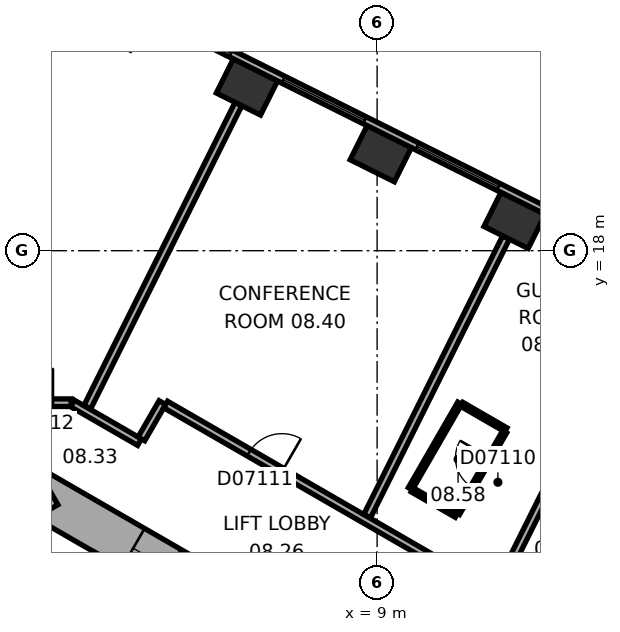
"""IFC4 building model, lengths in metres.
Left out: names, types, materials, properties, quantities, classifications, styles, units other than length and angle.
Written with IfcOpenShell. Run it as: python <this file> out.ifc"""

import sys

from ifc_helpers import new_model, si_unit, direction, frame, frame_2d, origin, origin_2d, place, context, subcontext, project, spatial, rectangle, extrude, element, fill, save


model = new_model("IFC4")
c1 = context("Model", 3, precision=1e-05, world=origin(), true_north=direction((0.0, 1.0)))
c2 = subcontext(c1, "Body", "Model", "MODEL_VIEW")
j1 = project(units=[si_unit("LENGTHUNIT", "METRE"), si_unit("PLANEANGLEUNIT", "RADIAN")], contexts=[c1])
p1 = place(None, origin())
s1 = spatial("IfcSite", under=j1, at=p1, CompositionType="ELEMENT")
p2 = place(p1, origin())
s2 = spatial("IfcBuilding", under=s1, at=p2, CompositionType="ELEMENT")
p3 = place(p2, frame((0.0, 0.0, 47.3)))
s3 = spatial("IfcBuildingStorey", under=s2, at=p3, CompositionType="ELEMENT", Elevation=47.3)
for number, where, z_axis, x_axis in (
    (1, (12.616, 18.795, 0.0), (0.0, 0.0, 1.0), (-0.895, 0.446, 0.0)),
    (2, (9.095, 20.551, 0.0), (0.0, 0.0, 1.0), (-0.895, 0.446, 0.0)),
    (3, (5.574, 22.306, 0.0), (0.0, 0.0, 1.0), (-0.895, 0.446, 0.0)),
):
    element("IfcColumn", number, at=place(p3, frame(where, z_axis=z_axis, x_axis=x_axis)), inside=s3, PredefinedType="COLUMN", context=c2, shape_type="SweptSolid", body=[
        extrude(rectangle(XDim=1.3, YDim=1.0, at=origin_2d()), origin(), (0.0, 0.0, 1.0), 3.3),
    ])
p4 = place(p3, frame((10.4, 5.658, 0.0), z_axis=(0.0, 0.0, 1.0), x_axis=(-0.866021384402, 0.500006961711, 0.0)))
e4 = element("IfcWall", 4, at=p4, inside=s3, PredefinedType="SHEAR", context=c2, shape_type="SweptSolid", body=[
    extrude(rectangle(XDim=12.355, YDim=1.2, at=frame_2d((6.178, 0.0))), origin(), (0.0, 0.0, 1.0), 3.3),
])
p5 = place(p4, frame((2.728, 0.0, 0.0)))
e5 = element("IfcOpeningElement", 5, at=p5, cuts=e4, PredefinedType="OPENING", context=c2, shape_type="SweptSolid", body=[
    extrude(rectangle(XDim=1.1, YDim=2.1, at=frame_2d((0.55, 1.05))), frame((0.0, 0.61, 0.0), z_axis=(0.0, -1.0, 0.0), x_axis=(1.0, 0.0, 0.0)), (0.0, 0.0, 1.0), 1.22),
])
p6 = place(p4, frame((5.328, 0.0, 0.0)))
e6 = element("IfcOpeningElement", 6, at=p6, cuts=e4, PredefinedType="OPENING", context=c2, shape_type="SweptSolid", body=[
    extrude(rectangle(XDim=1.1, YDim=2.1, at=frame_2d((0.55, 1.05))), frame((0.0, 0.61, 0.0), z_axis=(0.0, -1.0, 0.0), x_axis=(1.0, 0.0, 0.0)), (0.0, 0.0, 1.0), 1.22),
])
p7 = place(p4, frame((7.928, 0.0, 0.0)))
e7 = element("IfcOpeningElement", 7, at=p7, cuts=e4, PredefinedType="OPENING", context=c2, shape_type="SweptSolid", body=[
    extrude(rectangle(XDim=1.1, YDim=2.1, at=frame_2d((0.55, 1.05))), frame((0.0, 0.61, 0.0), z_axis=(0.0, -1.0, 0.0), x_axis=(1.0, 0.0, 0.0)), (0.0, 0.0, 1.0), 1.22),
])
p8 = place(p3, frame((0.3, 11.836, 0.0), z_axis=(0.0, 0.0, 1.0), x_axis=(-0.866021384402, -0.500006961711, 0.0)))
e8 = element("IfcWall", 8, at=p8, inside=s3, PredefinedType="SHEAR", context=c2, shape_type="SweptSolid", body=[
    extrude(rectangle(XDim=12.355, YDim=1.2, at=frame_2d((6.178, 0.0))), origin(), (0.0, 0.0, 1.0), 3.3),
])
p9 = place(p8, frame((6.378, 0.0, 0.0)))
e9 = element("IfcOpeningElement", 9, at=p9, cuts=e8, PredefinedType="OPENING", context=c2, shape_type="SweptSolid", body=[
    extrude(rectangle(XDim=1.5, YDim=2.1, at=frame_2d((0.75, 1.05))), frame((0.0, 0.61, 0.0), z_axis=(0.0, -1.0, 0.0), x_axis=(1.0, 0.0, 0.0)), (0.0, 0.0, 1.0), 1.22),
])
p10 = place(p8, frame((1.828, 0.0, 0.0)))
e10 = element("IfcOpeningElement", 10, at=p10, cuts=e8, PredefinedType="OPENING", context=c2, shape_type="SweptSolid", body=[
    extrude(rectangle(XDim=1.1, YDim=2.1, at=frame_2d((0.55, 1.05))), frame((0.0, 0.61, 0.0), z_axis=(0.0, -1.0, 0.0), x_axis=(1.0, 0.0, 0.0)), (0.0, 0.0, 1.0), 1.22),
])
p11 = place(p3, frame((20.63, 15.47, 0.0), z_axis=(0.0, 0.0, 1.0), x_axis=(-0.894934518609, 0.446197498203, 0.0)))
e11 = element("IfcWall", 11, at=p11, inside=s3, PredefinedType="STANDARD", context=c2, shape_type="SweptSolid", body=[
    extrude(rectangle(XDim=21.246, YDim=0.2, at=frame_2d((10.623, 0.0))), origin(), (0.0, 0.0, 1.0), 3.3),
])
p12 = place(p11, frame((1.553, 0.0, 0.8)))
e12 = element("IfcOpeningElement", 12, at=p12, cuts=e11, PredefinedType="OPENING", context=c2, shape_type="SweptSolid", body=[
    extrude(rectangle(XDim=2.4, YDim=1.7, at=frame_2d((1.2, 0.85))), frame((0.0, 0.11, 0.0), z_axis=(0.0, -1.0, 0.0), x_axis=(1.0, 0.0, 0.0)), (0.0, 0.0, 1.0), 0.22),
])
p13 = place(p11, frame((5.488, 0.0, 0.8)))
e13 = element("IfcOpeningElement", 13, at=p13, cuts=e11, PredefinedType="OPENING", context=c2, shape_type="SweptSolid", body=[
    extrude(rectangle(XDim=2.4, YDim=1.7, at=frame_2d((1.2, 0.85))), frame((0.0, 0.11, 0.0), z_axis=(0.0, -1.0, 0.0), x_axis=(1.0, 0.0, 0.0)), (0.0, 0.0, 1.0), 0.22),
])
p14 = place(p11, frame((9.422, 0.0, 0.8)))
e14 = element("IfcOpeningElement", 14, at=p14, cuts=e11, PredefinedType="OPENING", context=c2, shape_type="SweptSolid", body=[
    extrude(rectangle(XDim=2.4, YDim=1.7, at=frame_2d((1.2, 0.85))), frame((0.0, 0.11, 0.0), z_axis=(0.0, -1.0, 0.0), x_axis=(1.0, 0.0, 0.0)), (0.0, 0.0, 1.0), 0.22),
])
p15 = place(p11, frame((13.357, 0.0, 0.8)))
e15 = element("IfcOpeningElement", 15, at=p15, cuts=e11, PredefinedType="OPENING", context=c2, shape_type="SweptSolid", body=[
    extrude(rectangle(XDim=2.4, YDim=1.7, at=frame_2d((1.2, 0.85))), frame((0.0, 0.11, 0.0), z_axis=(0.0, -1.0, 0.0), x_axis=(1.0, 0.0, 0.0)), (0.0, 0.0, 1.0), 0.22),
])
p16 = place(p11, frame((17.292, 0.0, 0.8)))
e16 = element("IfcOpeningElement", 16, at=p16, cuts=e11, PredefinedType="OPENING", context=c2, shape_type="SweptSolid", body=[
    extrude(rectangle(XDim=2.4, YDim=1.7, at=frame_2d((1.2, 0.85))), frame((0.0, 0.11, 0.0), z_axis=(0.0, -1.0, 0.0), x_axis=(1.0, 0.0, 0.0)), (0.0, 0.0, 1.0), 0.22),
])
p17 = place(p3, frame((0.532, 8.122, 0.0), z_axis=(0.0, 0.0, 1.0), x_axis=(0.500077893725, 0.86598042715, 0.0)))
e17 = element("IfcWall", 17, at=p17, inside=s3, PredefinedType="PARTITIONING", context=c2, shape_type="SweptSolid", body=[
    extrude(rectangle(XDim=2.2, YDim=0.2, at=frame_2d((1.1, 0.0))), origin(), (0.0, 0.0, 1.0), 3.05),
])
p18 = place(p3, frame((0.767, 8.872, 0.0), z_axis=(0.0, 0.0, 1.0), x_axis=(-0.499994660107, 0.866028486751, 0.0)))
e18 = element("IfcWall", 18, at=p18, inside=s3, PredefinedType="PARTITIONING", context=c2, shape_type="SweptSolid", body=[
    extrude(rectangle(XDim=2.2, YDim=0.2, at=frame_2d((1.1, 0.0))), origin(), (0.0, 0.0, 1.0), 3.05),
])
p19 = place(p3, frame((0.95, 14.001, 0.0), z_axis=(0.0, 0.0, 1.0), x_axis=(-1.0, 0.0, 0.0)))
e19 = element("IfcWall", 19, at=p19, inside=s3, PredefinedType="PARTITIONING", context=c2, shape_type="SweptSolid", body=[
    extrude(rectangle(XDim=1.86, YDim=0.2, at=frame_2d((0.93, 0.0))), origin(), (0.0, 0.0, 1.0), 3.05),
])
p20 = place(p19, frame((0.48, 0.0, 0.0)))
e20 = element("IfcOpeningElement", 20, at=p20, cuts=e19, PredefinedType="OPENING", context=c2, shape_type="SweptSolid", body=[
    extrude(rectangle(XDim=0.9, YDim=2.1, at=frame_2d((0.45, 1.05))), frame((0.0, 0.11, 0.0), z_axis=(0.0, -1.0, 0.0), x_axis=(1.0, 0.0, 0.0)), (0.0, 0.0, 1.0), 0.22),
])
p21 = place(p3, frame((2.748, 12.962, 0.0), z_axis=(0.0, 0.0, 1.0), x_axis=(-0.866013897511, 0.50001992892, 0.0)))
e21 = element("IfcWall", 21, at=p21, inside=s3, PredefinedType="PARTITIONING", context=c2, shape_type="SweptSolid", body=[
    extrude(rectangle(XDim=2.037, YDim=0.2, at=frame_2d((1.018, 0.0))), origin(), (0.0, 0.0, 1.0), 3.05),
])
p22 = place(p3, frame((3.349, 14.002, 0.0), z_axis=(0.0, 0.0, 1.0), x_axis=(-0.500074377092, -0.865982457891, 0.0)))
e22 = element("IfcWall", 22, at=p22, inside=s3, PredefinedType="PARTITIONING", context=c2, shape_type="SweptSolid", body=[
    extrude(rectangle(XDim=1.101, YDim=0.2, at=frame_2d((0.55, 0.0))), origin(), (0.0, 0.0, 1.0), 3.05),
])
p23 = place(p3, frame((5.351, 21.859, 0.0), z_axis=(0.0, 0.0, 1.0), x_axis=(-0.446205309328, -0.894930624086, 0.0)))
e23 = element("IfcWall", 23, at=p23, inside=s3, PredefinedType="PARTITIONING", context=c2, shape_type="SweptSolid", body=[
    extrude(rectangle(XDim=8.913, YDim=0.2, at=frame_2d((4.457, 0.0))), origin(), (0.0, 0.0, 1.0), 2.6),
])
p24 = place(p3, frame((9.875, 11.736, 0.0), z_axis=(0.0, 0.0, 1.0), x_axis=(0.499936506574, 0.866062058628, 0.0)))
e24 = element("IfcWall", 24, at=p24, inside=s3, PredefinedType="PARTITIONING", context=c2, shape_type="SweptSolid", body=[
    extrude(rectangle(XDim=2.6, YDim=0.12, at=frame_2d((1.3, 0.0))), origin(), (0.0, 0.0, 1.0), 3.05),
])
p25 = place(p3, frame((10.885, 9.652, 0.0), z_axis=(0.0, 0.0, 1.0), x_axis=(-0.866033868542, 0.499985338323, 0.0)))
e25 = element("IfcWall", 25, at=p25, inside=s3, PredefinedType="PARTITIONING", context=c2, shape_type="SweptSolid", body=[
    extrude(rectangle(XDim=8.602, YDim=0.2, at=frame_2d((4.301, 0.0))), origin(), (0.0, 0.0, 1.0), 3.05),
])
p26 = place(p25, frame((5.069, 0.0, 0.0)))
e26 = element("IfcOpeningElement", 26, at=p26, cuts=e25, PredefinedType="OPENING", context=c2, shape_type="SweptSolid", body=[
    extrude(rectangle(XDim=1.0, YDim=2.1, at=frame_2d((0.5, 1.05))), frame((0.0, 0.11, 0.0), z_axis=(0.0, -1.0, 0.0), x_axis=(1.0, 0.0, 0.0)), (0.0, 0.0, 1.0), 0.22),
])
for number, where, z_axis, x_axis in (
    (27, (11.087, 11.036, 0.0), (0.0, 0.0, 1.0), (-0.866, 0.5, 0.0)),
    (28, (11.226, 13.958, 0.0), (0.0, 0.0, 1.0), (0.866, -0.5, 0.0)),
):
    element("IfcWall", number, at=place(p3, frame(where, z_axis=z_axis, x_axis=x_axis)), inside=s3, PredefinedType="PARTITIONING", context=c2, shape_type="SweptSolid", body=[
        extrude(rectangle(XDim=1.34, YDim=0.12, at=frame_2d((0.67, 0.0))), origin(), (0.0, 0.0, 1.0), 3.05),
    ])
p27 = place(p3, frame((12.357, 13.236, 0.0), z_axis=(0.0, 0.0, 1.0), x_axis=(-0.50000366821, -0.866023285932, 0.0)))
e29 = element("IfcWall", 29, at=p27, inside=s3, PredefinedType="PARTITIONING", context=c2, shape_type="SweptSolid", body=[
    extrude(rectangle(XDim=2.48, YDim=0.12, at=frame_2d((1.24, 0.0))), origin(), (0.0, 0.0, 1.0), 3.05),
])
p28 = place(p27, frame((0.79, 0.0, 0.0)))
e30 = element("IfcOpeningElement", 30, at=p28, cuts=e29, PredefinedType="OPENING", context=c2, shape_type="SweptSolid", body=[
    extrude(rectangle(XDim=0.9, YDim=2.1, at=frame_2d((0.45, 1.05))), frame((0.0, 0.07, 0.0), z_axis=(0.0, -1.0, 0.0), x_axis=(1.0, 0.0, 0.0)), (0.0, 0.0, 1.0), 0.14),
])
p29 = place(p3, frame((12.393, 18.348, 0.0), z_axis=(0.0, 0.0, 1.0), x_axis=(-0.446176022699, -0.894945225569, 0.0)))
e31 = element("IfcWall", 31, at=p29, inside=s3, PredefinedType="PARTITIONING", context=c2, shape_type="SweptSolid", body=[
    extrude(rectangle(XDim=8.191, YDim=0.2, at=frame_2d((4.095, 0.0))), origin(), (0.0, 0.0, 1.0), 2.6),
])
p30 = place(p3, frame((14.974, 10.146, 0.0), z_axis=(0.0, 0.0, 1.0), x_axis=(-0.86599746015, -0.500048396672, 0.0)))
e32 = element("IfcWall", 32, at=p30, inside=s3, PredefinedType="PARTITIONING", context=c2, shape_type="SweptSolid", body=[
    extrude(rectangle(XDim=2.68, YDim=0.12, at=frame_2d((1.34, 0.0))), origin(), (0.0, 0.0, 1.0), 3.05),
])
p31 = place(p30, frame((0.69, 0.0, 0.0)))
e33 = element("IfcOpeningElement", 33, at=p31, cuts=e32, PredefinedType="OPENING", context=c2, shape_type="SweptSolid", body=[
    extrude(rectangle(XDim=0.9, YDim=2.1, at=frame_2d((0.45, 1.05))), frame((0.0, 0.07, 0.0), z_axis=(0.0, -1.0, 0.0), x_axis=(1.0, 0.0, 0.0)), (0.0, 0.0, 1.0), 0.14),
])
p32 = place(p3, frame((15.915, 16.592, 0.0), z_axis=(0.0, 0.0, 1.0), x_axis=(-0.446199736347, -0.894933402709, 0.0)))
e34 = element("IfcWall", 34, at=p32, inside=s3, PredefinedType="PARTITIONING", context=c2, shape_type="SweptSolid", body=[
    extrude(rectangle(XDim=9.635, YDim=0.2, at=frame_2d((4.817, 0.0))), origin(), (0.0, 0.0, 1.0), 3.05),
])
p33 = place(p14, origin())
e35 = element("IfcWindow", 35, at=p33, inside=s3, PartitioningType="SINGLE_PANEL", PredefinedType="WINDOW", context=c2, shape_type="SweptSolid", body=[
    extrude(rectangle(XDim=2.4, YDim=1.7, at=frame_2d((1.2, 0.85))), frame((0.0, 0.03, 0.0), z_axis=(0.0, -1.0, 0.0), x_axis=(1.0, 0.0, 0.0)), (0.0, 0.0, 1.0), 0.06),
])
fill(e14, e35)
p34 = place(p15, origin())
e36 = element("IfcWindow", 36, at=p34, inside=s3, PartitioningType="SINGLE_PANEL", PredefinedType="WINDOW", context=c2, shape_type="SweptSolid", body=[
    extrude(rectangle(XDim=2.4, YDim=1.7, at=frame_2d((1.2, 0.85))), frame((0.0, 0.03, 0.0), z_axis=(0.0, -1.0, 0.0), x_axis=(1.0, 0.0, 0.0)), (0.0, 0.0, 1.0), 0.06),
])
fill(e15, e36)
p35 = place(p16, origin())
e37 = element("IfcWindow", 37, at=p35, inside=s3, PartitioningType="SINGLE_PANEL", PredefinedType="WINDOW", context=c2, shape_type="SweptSolid", body=[
    extrude(rectangle(XDim=2.4, YDim=1.7, at=frame_2d((1.2, 0.85))), frame((0.0, 0.03, 0.0), z_axis=(0.0, -1.0, 0.0), x_axis=(1.0, 0.0, 0.0)), (0.0, 0.0, 1.0), 0.06),
])
fill(e16, e37)
p36 = place(p7, origin())
e38 = element("IfcDoor", 38, at=p36, inside=s3, OperationType="DOUBLE_DOOR_SLIDING", PredefinedType="DOOR", context=c2, shape_type="SweptSolid", body=[
    extrude(rectangle(XDim=1.1, YDim=2.1, at=frame_2d((0.55, 1.05))), frame((0.0, 0.025, 0.0), z_axis=(0.0, -1.0, 0.0), x_axis=(1.0, 0.0, 0.0)), (0.0, 0.0, 1.0), 0.05),
])
fill(e7, e38)
p37 = place(p28, origin())
e39 = element("IfcDoor", 39, at=p37, inside=s3, OperationType="SINGLE_SWING_LEFT", PredefinedType="DOOR", context=c2, shape_type="SweptSolid", body=[
    extrude(rectangle(XDim=0.9, YDim=2.1, at=frame_2d((0.45, 1.05))), frame((0.0, 0.025, 0.0), z_axis=(0.0, -1.0, 0.0), x_axis=(1.0, 0.0, 0.0)), (0.0, 0.0, 1.0), 0.05),
])
fill(e30, e39)
p38 = place(p26, origin())
e40 = element("IfcDoor", 40, at=p38, inside=s3, OperationType="SINGLE_SWING_LEFT", PredefinedType="DOOR", context=c2, shape_type="SweptSolid", body=[
    extrude(rectangle(XDim=1.0, YDim=2.1, at=frame_2d((0.5, 1.05))), frame((0.0, 0.025, 0.0), z_axis=(0.0, -1.0, 0.0), x_axis=(1.0, 0.0, 0.0)), (0.0, 0.0, 1.0), 0.05),
])
fill(e26, e40)
p39 = place(p20, origin())
e41 = element("IfcDoor", 41, at=p39, inside=s3, OperationType="SINGLE_SWING_LEFT", PredefinedType="DOOR", context=c2, shape_type="SweptSolid", body=[
    extrude(rectangle(XDim=0.9, YDim=2.1, at=frame_2d((0.45, 1.05))), frame((0.0, 0.025, 0.0), z_axis=(0.0, -1.0, 0.0), x_axis=(1.0, 0.0, 0.0)), (0.0, 0.0, 1.0), 0.05),
])
fill(e20, e41)
save(model, sys.argv[1])
